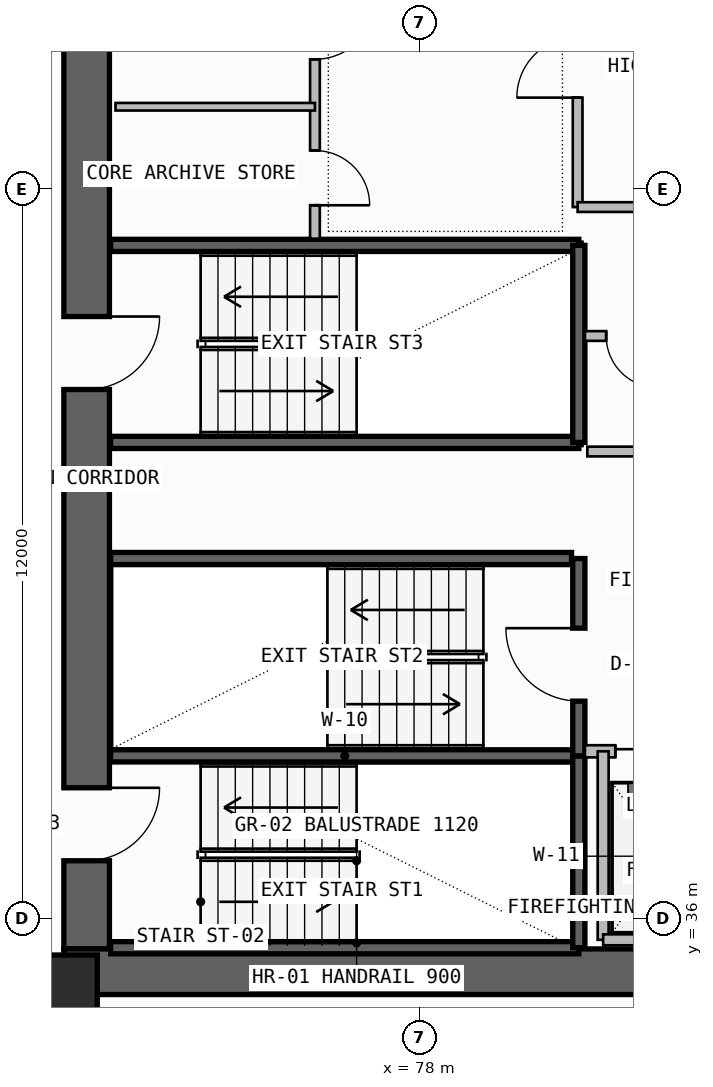
"""IFC4 building model, lengths in metres.
Left out: names, types, materials, properties, quantities, classifications, styles, units other than length and angle.
Written with IfcOpenShell. Run it as: python <this file> out.ifc"""

import sys

from ifc_helpers import new_model, si_unit, direction, frame, frame_2d, origin, origin_2d, place, context, subcontext, project, spatial, rectangle, extrude, element, fill, save


model = new_model("IFC4")
c1 = context("Model", 3, precision=1e-05, world=origin(), true_north=direction((0.0, 1.0)))
c2 = subcontext(c1, "Body", "Model", "MODEL_VIEW")
j1 = project(units=[si_unit("LENGTHUNIT", "METRE"), si_unit("PLANEANGLEUNIT", "RADIAN")], contexts=[c1])
p1 = place(None, origin())
s1 = spatial("IfcSite", under=j1, at=p1, CompositionType="ELEMENT")
p2 = place(p1, origin())
s2 = spatial("IfcBuilding", under=s1, at=p2, CompositionType="ELEMENT")
p3 = place(p2, frame((0.0, 0.0, 214.98)))
s3 = spatial("IfcBuildingStorey", under=s2, at=p3, CompositionType="ELEMENT", Elevation=214.98)
p4 = place(p3, frame((72.525, 35.5, -0.26), z_axis=(0.0, 0.0, 1.0), x_axis=(0.0, 1.0, 0.0)))
e1 = element("IfcWall", 1, at=p4, inside=s3, PredefinedType="SHEAR", context=c2, shape_type="SweptSolid", body=[
    extrude(rectangle(XDim=7.85, YDim=0.75, at=frame_2d((3.925, 0.0))), origin(), (0.0, 0.0, 1.0), 3.52),
])
p5 = place(p4, frame((1.45, 0.0, 0.26)))
e2 = element("IfcOpeningElement", 2, at=p5, cuts=e1, PredefinedType="OPENING", context=c2, shape_type="SweptSolid", body=[
    extrude(rectangle(XDim=1.2, YDim=2.2, at=frame_2d((0.6, 1.1))), frame((0.0, 0.385, 0.0), z_axis=(0.0, -1.0, 0.0), x_axis=(1.0, 0.0, 0.0)), (0.0, 0.0, 1.0), 0.77),
])
p6 = place(p3, frame((72.15, 35.125, -0.26), z_axis=(0.0, 0.0, 1.0), x_axis=(1.0, 0.0, 0.0)))
e3 = element("IfcWall", 3, at=p6, inside=s3, PredefinedType="SHEAR", context=c2, shape_type="SweptSolid", body=[
    extrude(rectangle(XDim=13.6, YDim=0.75, at=frame_2d((6.8, 0.0))), origin(), (0.0, 0.0, 1.0), 3.52),
])
p7 = place(p3, frame((72.525, 43.35, -0.26), z_axis=(0.0, 0.0, 1.0), x_axis=(0.0, 1.0, 0.0)))
e4 = element("IfcWall", 4, at=p7, inside=s3, PredefinedType="SHEAR", context=c2, shape_type="SweptSolid", body=[
    extrude(rectangle(XDim=12.7, YDim=0.75, at=frame_2d((6.35, 0.0))), origin(), (0.0, 0.0, 1.0), 3.52),
])
p8 = place(p7, frame((1.35, 0.0, 0.26)))
e5 = element("IfcOpeningElement", 5, at=p8, cuts=e4, PredefinedType="OPENING", context=c2, shape_type="SweptSolid", body=[
    extrude(rectangle(XDim=1.2, YDim=2.2, at=frame_2d((0.6, 1.1))), frame((0.0, 0.385, 0.0), z_axis=(0.0, -1.0, 0.0), x_axis=(1.0, 0.0, 0.0)), (0.0, 0.0, 1.0), 0.77),
])
p9 = place(p3, frame((72.0, 34.7, 0.0), z_axis=(0.0, 0.0, 1.0), x_axis=(1.0, 0.0, 0.0)))
e6 = element("IfcColumn", 6, at=p9, inside=s3, PredefinedType="COLUMN", context=c2, shape_type="SweptSolid", body=[
    extrude(rectangle(XDim=1.4, YDim=1.4, at=origin_2d()), origin(), (0.0, 0.0, 1.0), 3.52),
])
for number, where, z_axis, x_axis in (
    (7, (72.92, 35.52, -0.26), (0.0, 0.0, 1.0), (1.0, 0.0, 0.0)),
    (8, (72.92, 38.675, -0.26), (0.0, 0.0, 1.0), (1.0, 0.0, 0.0)),
):
    element("IfcWall", number, at=place(p3, frame(where, z_axis=z_axis, x_axis=x_axis)), inside=s3, PredefinedType="SOLIDWALL", context=c2, shape_type="SweptSolid", body=[
        extrude(rectangle(XDim=7.7, YDim=0.2, at=frame_2d((3.85, 0.0))), origin(), (0.0, 0.0, 1.0), 3.52),
    ])
p10 = place(p3, frame((80.62, 35.52, -0.26), z_axis=(0.0, 0.0, 1.0), x_axis=(0.0, 1.0, 0.0)))
e9 = element("IfcWall", 9, at=p10, inside=s3, PredefinedType="SOLIDWALL", context=c2, shape_type="SweptSolid", body=[
    extrude(rectangle(XDim=3.155, YDim=0.2, at=frame_2d((1.578, 0.0))), origin(), (0.0, 0.0, 1.0), 3.52),
])
p11 = place(p3, frame((80.62, 38.675, -0.26), z_axis=(0.0, 0.0, 1.0), x_axis=(0.0, 1.0, 0.0)))
e10 = element("IfcWall", 10, at=p11, inside=s3, PredefinedType="SOLIDWALL", context=c2, shape_type="SweptSolid", body=[
    extrude(rectangle(XDim=3.245, YDim=0.2, at=frame_2d((1.623, 0.0))), origin(), (0.0, 0.0, 1.0), 3.52),
])
p12 = place(p11, frame((0.9, 0.0, 0.26)))
e11 = element("IfcOpeningElement", 11, at=p12, cuts=e10, PredefinedType="OPENING", context=c2, shape_type="SweptSolid", body=[
    extrude(rectangle(XDim=1.2, YDim=2.2, at=frame_2d((0.6, 1.1))), frame((0.0, 0.11, 0.0), z_axis=(0.0, -1.0, 0.0), x_axis=(1.0, 0.0, 0.0)), (0.0, 0.0, 1.0), 0.22),
])
p13 = place(p3, frame((80.72, 38.75, 0.0), z_axis=(0.0, 0.0, 1.0), x_axis=(1.0, 0.0, 0.0)))
e12 = element("IfcWall", 12, at=p13, inside=s3, PredefinedType="SOLIDWALL", context=c2, shape_type="SweptSolid", body=[
    extrude(rectangle(XDim=4.26, YDim=0.2, at=frame_2d((2.13, 0.0))), origin(), (0.0, 0.0, 1.0), 3.26),
])
p14 = place(p13, frame((0.5, 0.0, 0.0)))
e13 = element("IfcOpeningElement", 13, at=p14, cuts=e12, PredefinedType="OPENING", context=c2, shape_type="SweptSolid", body=[
    extrude(rectangle(XDim=1.3, YDim=2.3, at=frame_2d((0.65, 1.15))), frame((0.0, 0.11, 0.0), z_axis=(0.0, -1.0, 0.0), x_axis=(1.0, 0.0, 0.0)), (0.0, 0.0, 1.0), 0.22),
])
p15 = place(p13, frame((2.45, 0.0, 0.0)))
e14 = element("IfcOpeningElement", 14, at=p15, cuts=e12, PredefinedType="OPENING", context=c2, shape_type="SweptSolid", body=[
    extrude(rectangle(XDim=1.3, YDim=2.3, at=frame_2d((0.65, 1.15))), frame((0.0, 0.11, 0.0), z_axis=(0.0, -1.0, 0.0), x_axis=(1.0, 0.0, 0.0)), (0.0, 0.0, 1.0), 0.22),
])
p16 = place(p3, frame((81.02, 35.65, 0.0), z_axis=(0.0, 0.0, 1.0), x_axis=(0.0, 1.0, 0.0)))
e15 = element("IfcWall", 15, at=p16, inside=s3, PredefinedType="SOLIDWALL", context=c2, shape_type="SweptSolid", body=[
    extrude(rectangle(XDim=3.1, YDim=0.18, at=frame_2d((1.55, 0.0))), origin(), (0.0, 0.0, 1.0), 3.26),
])
p17 = place(p3, frame((81.02, 35.65, 0.0), z_axis=(0.0, 0.0, 1.0), x_axis=(1.0, 0.0, 0.0)))
e16 = element("IfcWall", 16, at=p17, inside=s3, PredefinedType="SOLIDWALL", context=c2, shape_type="SweptSolid", body=[
    extrude(rectangle(XDim=3.93, YDim=0.18, at=frame_2d((1.965, 0.0))), origin(), (0.0, 0.0, 1.0), 3.26),
])
p18 = place(p3, frame((72.92, 41.92, -0.26), z_axis=(0.0, 0.0, 1.0), x_axis=(1.0, 0.0, 0.0)))
e17 = element("IfcWall", 17, at=p18, inside=s3, PredefinedType="SOLIDWALL", context=c2, shape_type="SweptSolid", body=[
    extrude(rectangle(XDim=7.58, YDim=0.2, at=frame_2d((3.79, 0.0))), origin(), (0.0, 0.0, 1.0), 3.52),
])
for number, where, z_axis, x_axis in (
    (18, (72.92, 43.83, -0.26), (0.0, 0.0, 1.0), (1.0, 0.0, 0.0)),
    (19, (72.92, 47.07, -0.26), (0.0, 0.0, 1.0), (1.0, 0.0, 0.0)),
):
    element("IfcWall", number, at=place(p3, frame(where, z_axis=z_axis, x_axis=x_axis)), inside=s3, PredefinedType="SOLIDWALL", context=c2, shape_type="SweptSolid", body=[
        extrude(rectangle(XDim=7.7, YDim=0.2, at=frame_2d((3.85, 0.0))), origin(), (0.0, 0.0, 1.0), 3.52),
    ])
p19 = place(p3, frame((80.62, 43.83, -0.26), z_axis=(0.0, 0.0, 1.0), x_axis=(0.0, 1.0, 0.0)))
e20 = element("IfcWall", 20, at=p19, inside=s3, PredefinedType="SOLIDWALL", context=c2, shape_type="SweptSolid", body=[
    extrude(rectangle(XDim=3.24, YDim=0.2, at=frame_2d((1.62, 0.0))), origin(), (0.0, 0.0, 1.0), 3.52),
])
p20 = place(p3, frame((80.72, 45.58, 0.0), z_axis=(0.0, 0.0, 1.0), x_axis=(1.0, 0.0, 0.0)))
e21 = element("IfcWall", 21, at=p20, inside=s3, PredefinedType="PLUMBINGWALL", context=c2, shape_type="SweptSolid", body=[
    extrude(rectangle(XDim=4.23, YDim=0.16, at=frame_2d((2.115, 0.0))), origin(), (0.0, 0.0, 1.0), 3.26),
])
p21 = place(p20, frame((0.35, 0.0, 0.0)))
e22 = element("IfcOpeningElement", 22, at=p21, cuts=e21, PredefinedType="OPENING", context=c2, shape_type="SweptSolid", body=[
    extrude(rectangle(XDim=0.85, YDim=2.05, at=frame_2d((0.425, 1.025))), frame((0.0, 0.09, 0.0), z_axis=(0.0, -1.0, 0.0), x_axis=(1.0, 0.0, 0.0)), (0.0, 0.0, 1.0), 0.18),
])
p22 = place(p20, frame((2.35, 0.0, 0.0)))
e23 = element("IfcOpeningElement", 23, at=p22, cuts=e21, PredefinedType="OPENING", context=c2, shape_type="SweptSolid", body=[
    extrude(rectangle(XDim=0.9, YDim=2.1, at=frame_2d((0.45, 1.05))), frame((0.0, 0.09, 0.0), z_axis=(0.0, -1.0, 0.0), x_axis=(1.0, 0.0, 0.0)), (0.0, 0.0, 1.0), 0.18),
])
p23 = place(p3, frame((80.76, 43.68, 0.0), z_axis=(0.0, 0.0, 1.0), x_axis=(1.0, 0.0, 0.0)))
e24 = element("IfcWall", 24, at=p23, inside=s3, PredefinedType="PLUMBINGWALL", context=c2, shape_type="SweptSolid", body=[
    extrude(rectangle(XDim=4.19, YDim=0.16, at=frame_2d((2.095, 0.0))), origin(), (0.0, 0.0, 1.0), 3.26),
])
p24 = place(p3, frame((76.28, 47.18, 0.0), z_axis=(0.0, 0.0, 1.0), x_axis=(0.0, 1.0, 0.0)))
e25 = element("IfcWall", 25, at=p24, inside=s3, PredefinedType="SOLIDWALL", context=c2, shape_type="SweptSolid", body=[
    extrude(rectangle(XDim=5.14, YDim=0.16, at=frame_2d((2.57, 0.0))), origin(), (0.0, 0.0, 1.0), 3.26),
])
p25 = place(p24, frame((0.55, 0.0, 0.0)))
e26 = element("IfcOpeningElement", 26, at=p25, cuts=e25, PredefinedType="OPENING", context=c2, shape_type="SweptSolid", body=[
    extrude(rectangle(XDim=0.9, YDim=2.1, at=frame_2d((0.45, 1.05))), frame((0.0, 0.09, 0.0), z_axis=(0.0, -1.0, 0.0), x_axis=(1.0, 0.0, 0.0)), (0.0, 0.0, 1.0), 0.18),
])
p26 = place(p24, frame((2.95, 0.0, 0.0)))
e27 = element("IfcOpeningElement", 27, at=p26, cuts=e25, PredefinedType="OPENING", context=c2, shape_type="SweptSolid", body=[
    extrude(rectangle(XDim=1.0, YDim=2.2, at=frame_2d((0.5, 1.1))), frame((0.0, 0.09, 0.0), z_axis=(0.0, -1.0, 0.0), x_axis=(1.0, 0.0, 0.0)), (0.0, 0.0, 1.0), 0.18),
])
p27 = place(p3, frame((73.0, 49.35, 0.0), z_axis=(0.0, 0.0, 1.0), x_axis=(1.0, 0.0, 0.0)))
e28 = element("IfcWall", 28, at=p27, inside=s3, PredefinedType="PARTITIONING", context=c2, shape_type="SweptSolid", body=[
    extrude(rectangle(XDim=3.28, YDim=0.125, at=frame_2d((1.64, 0.0))), origin(), (0.0, 0.0, 1.0), 3.26),
])
p28 = place(p3, frame((80.6, 47.7, 0.0), z_axis=(0.0, 0.0, 1.0), x_axis=(0.0, 1.0, 0.0)))
e29 = element("IfcWall", 29, at=p28, inside=s3, PredefinedType="SOLIDWALL", context=c2, shape_type="SweptSolid", body=[
    extrude(rectangle(XDim=4.6, YDim=0.16, at=frame_2d((2.3, 0.0))), origin(), (0.0, 0.0, 1.0), 3.26),
])
p29 = place(p28, frame((1.8, 0.0, 0.0)))
e30 = element("IfcOpeningElement", 30, at=p29, cuts=e29, PredefinedType="OPENING", context=c2, shape_type="SweptSolid", body=[
    extrude(rectangle(XDim=1.0, YDim=2.2, at=frame_2d((0.5, 1.1))), frame((0.0, 0.09, 0.0), z_axis=(0.0, -1.0, 0.0), x_axis=(1.0, 0.0, 0.0)), (0.0, 0.0, 1.0), 0.18),
])
p30 = place(p3, frame((80.6, 47.7, 0.0), z_axis=(0.0, 0.0, 1.0), x_axis=(1.0, 0.0, 0.0)))
e31 = element("IfcWall", 31, at=p30, inside=s3, PredefinedType="SOLIDWALL", context=c2, shape_type="SweptSolid", body=[
    extrude(rectangle(XDim=4.4, YDim=0.16, at=frame_2d((2.2, 0.0))), origin(), (0.0, 0.0, 1.0), 3.26),
])
p31 = place(p5, frame((1.2, 0.0, 0.0), z_axis=(0.0, 0.0, 1.0), x_axis=(-1.0, 0.0, 0.0)))
e32 = element("IfcDoor", 32, at=p31, inside=s3, OperationType="SINGLE_SWING_LEFT", PredefinedType="USERDEFINED", context=c2, shape_type="SweptSolid", body=[
    extrude(rectangle(XDim=1.2, YDim=2.2, at=frame_2d((0.6, 1.1))), frame((0.0, 0.025, 0.0), z_axis=(0.0, -1.0, 0.0), x_axis=(1.0, 0.0, 0.0)), (0.0, 0.0, 1.0), 0.05),
])
fill(e2, e32)
p32 = place(p12, origin())
e33 = element("IfcDoor", 33, at=p32, inside=s3, OperationType="SINGLE_SWING_RIGHT", PredefinedType="USERDEFINED", context=c2, shape_type="SweptSolid", body=[
    extrude(rectangle(XDim=1.2, YDim=2.2, at=frame_2d((0.6, 1.1))), frame((0.0, 0.025, 0.0), z_axis=(0.0, -1.0, 0.0), x_axis=(1.0, 0.0, 0.0)), (0.0, 0.0, 1.0), 0.05),
])
fill(e11, e33)
p33 = place(p14, origin())
e34 = element("IfcDoor", 34, at=p33, inside=s3, OperationType="DOUBLE_DOOR_SLIDING", PredefinedType="DOOR", context=c2, shape_type="SweptSolid", body=[
    extrude(rectangle(XDim=1.3, YDim=2.3, at=frame_2d((0.65, 1.15))), frame((0.0, 0.025, 0.0), z_axis=(0.0, -1.0, 0.0), x_axis=(1.0, 0.0, 0.0)), (0.0, 0.0, 1.0), 0.05),
])
fill(e13, e34)
p34 = place(p8, frame((1.2, 0.0, 0.0), z_axis=(0.0, 0.0, 1.0), x_axis=(-1.0, 0.0, 0.0)))
e35 = element("IfcDoor", 35, at=p34, inside=s3, OperationType="SINGLE_SWING_LEFT", PredefinedType="USERDEFINED", context=c2, shape_type="SweptSolid", body=[
    extrude(rectangle(XDim=1.2, YDim=2.2, at=frame_2d((0.6, 1.1))), frame((0.0, 0.025, 0.0), z_axis=(0.0, -1.0, 0.0), x_axis=(1.0, 0.0, 0.0)), (0.0, 0.0, 1.0), 0.05),
])
fill(e5, e35)
p35 = place(p21, frame((0.85, 0.0, 0.0), z_axis=(0.0, 0.0, 1.0), x_axis=(-1.0, 0.0, 0.0)))
e36 = element("IfcDoor", 36, at=p35, inside=s3, OperationType="SINGLE_SWING_LEFT", PredefinedType="DOOR", context=c2, shape_type="SweptSolid", body=[
    extrude(rectangle(XDim=0.85, YDim=2.05, at=frame_2d((0.425, 1.025))), frame((0.0, 0.025, 0.0), z_axis=(0.0, -1.0, 0.0), x_axis=(1.0, 0.0, 0.0)), (0.0, 0.0, 1.0), 0.05),
])
fill(e22, e36)
p36 = place(p25, frame((0.9, 0.0, 0.0), z_axis=(0.0, 0.0, 1.0), x_axis=(-1.0, 0.0, 0.0)))
e37 = element("IfcDoor", 37, at=p36, inside=s3, OperationType="SINGLE_SWING_RIGHT", PredefinedType="DOOR", context=c2, shape_type="SweptSolid", body=[
    extrude(rectangle(XDim=0.9, YDim=2.1, at=frame_2d((0.45, 1.05))), frame((0.0, 0.025, 0.0), z_axis=(0.0, -1.0, 0.0), x_axis=(1.0, 0.0, 0.0)), (0.0, 0.0, 1.0), 0.05),
])
fill(e26, e37)
p37 = place(p26, frame((1.0, 0.0, 0.0), z_axis=(0.0, 0.0, 1.0), x_axis=(-1.0, 0.0, 0.0)))
e38 = element("IfcDoor", 38, at=p37, inside=s3, OperationType="SINGLE_SWING_LEFT", PredefinedType="DOOR", context=c2, shape_type="SweptSolid", body=[
    extrude(rectangle(XDim=1.0, YDim=2.2, at=frame_2d((0.5, 1.1))), frame((0.0, 0.025, 0.0), z_axis=(0.0, -1.0, 0.0), x_axis=(1.0, 0.0, 0.0)), (0.0, 0.0, 1.0), 0.05),
])
fill(e27, e38)
p38 = place(p29, origin())
e39 = element("IfcDoor", 39, at=p38, inside=s3, OperationType="SINGLE_SWING_LEFT", PredefinedType="DOOR", context=c2, shape_type="SweptSolid", body=[
    extrude(rectangle(XDim=1.0, YDim=2.2, at=frame_2d((0.5, 1.1))), frame((0.0, 0.025, 0.0), z_axis=(0.0, -1.0, 0.0), x_axis=(1.0, 0.0, 0.0)), (0.0, 0.0, 1.0), 0.05),
])
fill(e30, e39)
save(model, sys.argv[1])
